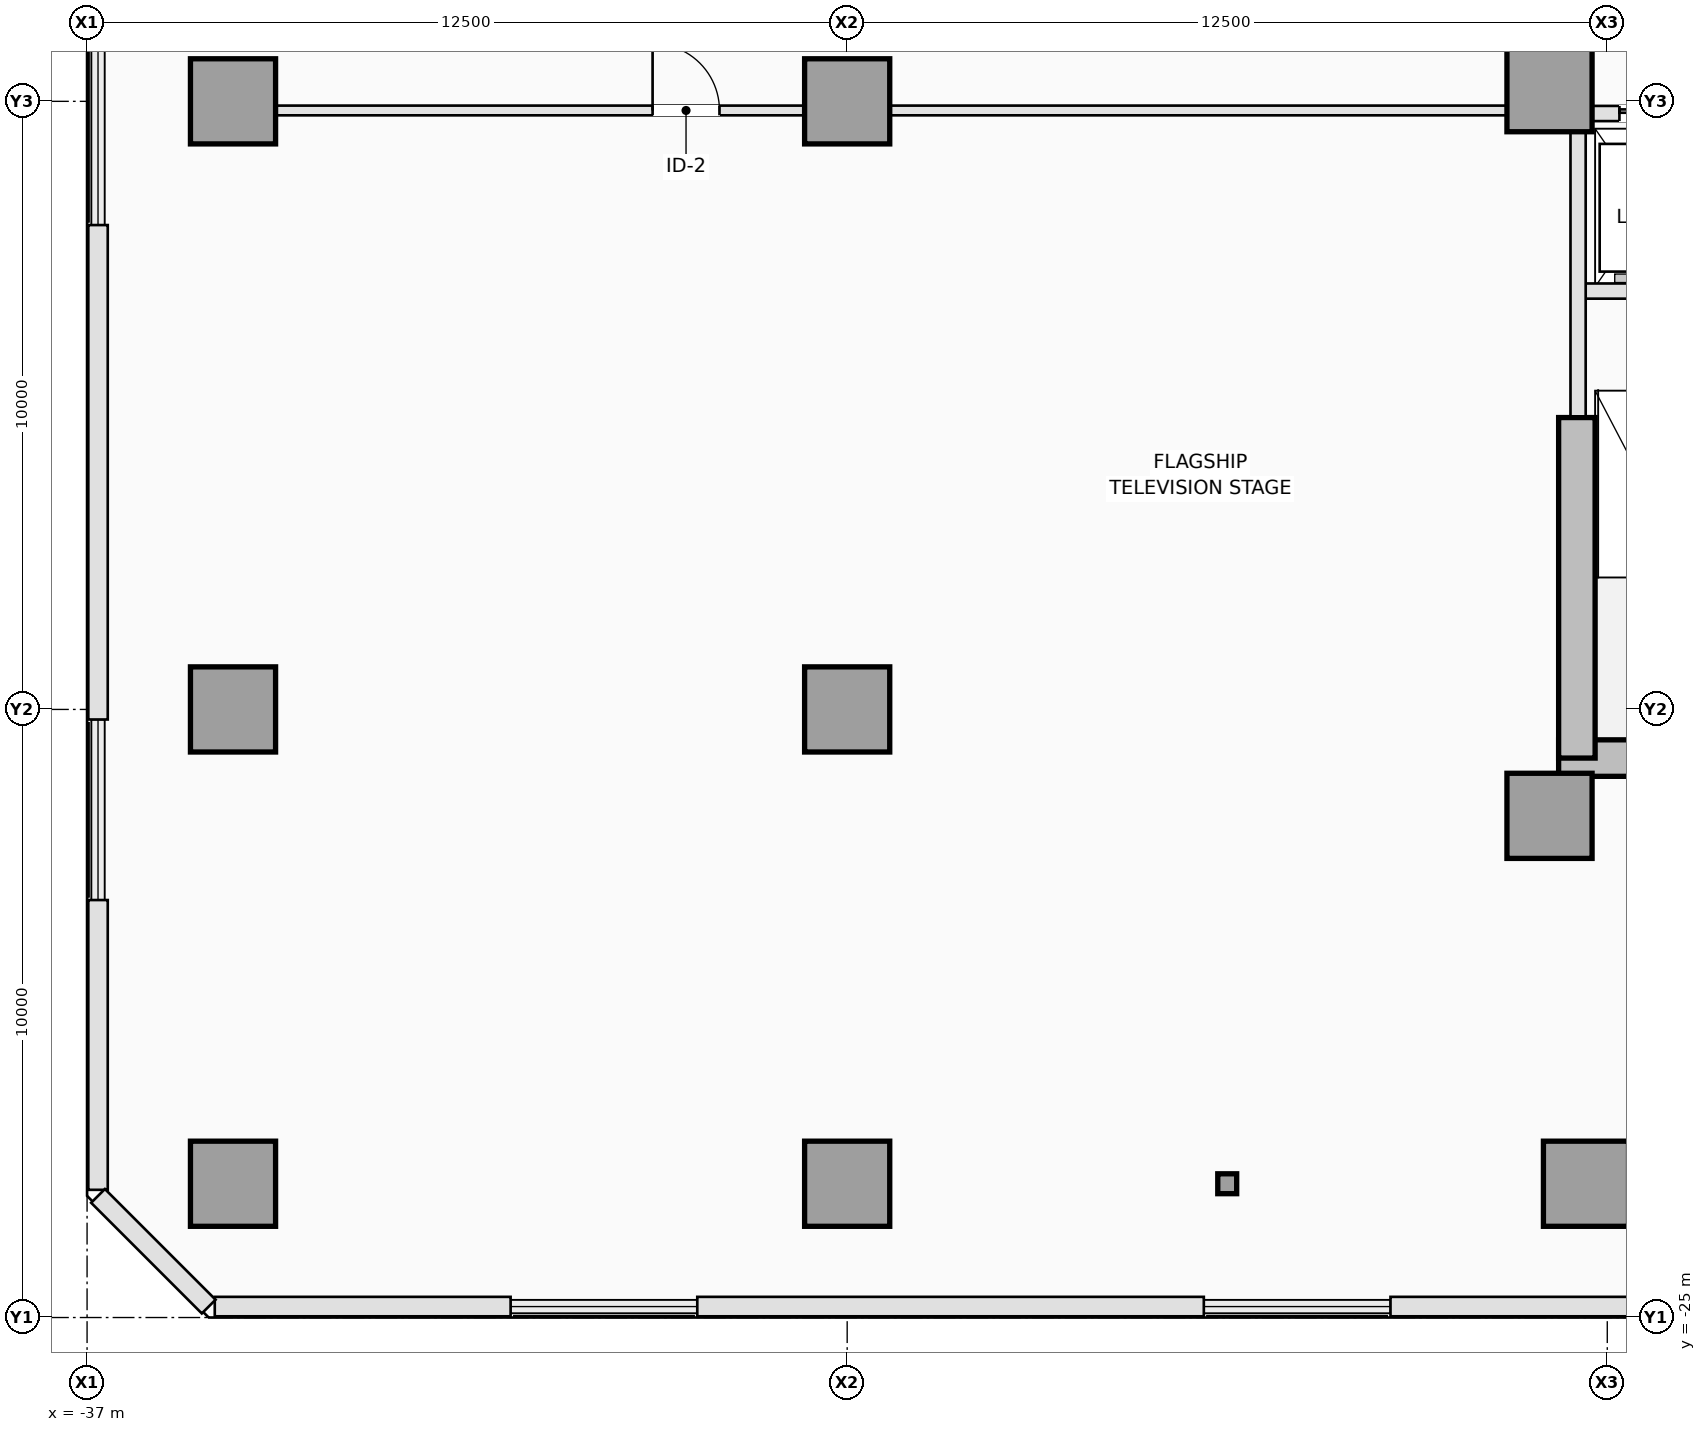
"""IFC4 building model, lengths in metres.
Left out: names, types, materials, properties, quantities, classifications, styles, units other than length and angle.
Written with IfcOpenShell. Run it as: python <this file> out.ifc"""

import sys

from ifc_helpers import new_model, si_unit, direction, frame, frame_2d, origin, origin_2d, place, context, subcontext, project, spatial, rectangle, i_section, extrude, element, fill, save


model = new_model("IFC4")
c1 = context("Model", 3, precision=1e-05, world=origin(), true_north=direction((0.0, 1.0)))
c2 = subcontext(c1, "Body", "Model", "MODEL_VIEW")
j1 = project(units=[si_unit("LENGTHUNIT", "METRE"), si_unit("PLANEANGLEUNIT", "RADIAN")], contexts=[c1])
p1 = place(None, origin())
s1 = spatial("IfcSite", under=j1, at=p1, CompositionType="ELEMENT")
p2 = place(p1, origin())
s2 = spatial("IfcBuilding", under=s1, at=p2, CompositionType="ELEMENT")
p3 = place(p2, frame((0.0, 0.0, 18.5)))
s3 = spatial("IfcBuildingStorey", under=s2, at=p3, CompositionType="ELEMENT", Elevation=18.5)
p4 = place(p3, frame((-12.8, -15.8, 0.0), z_axis=(0.0, 0.0, 1.0), x_axis=(1.0, 0.0, 0.0)))
e1 = element("IfcWall", 1, at=p4, inside=s3, PredefinedType="SHEAR", context=c2, shape_type="SweptSolid", body=[
    extrude(rectangle(XDim=4.2, YDim=0.6, at=frame_2d((2.1, 0.0))), origin(), (0.0, 0.0, 1.0), 4.5),
])
p5 = place(p3, frame((-12.5, -15.8, 0.0), z_axis=(0.0, 0.0, 1.0), x_axis=(0.0, 1.0, 0.0)))
e2 = element("IfcWall", 2, at=p5, inside=s3, PredefinedType="SHEAR", context=c2, shape_type="SweptSolid", body=[
    extrude(rectangle(XDim=5.6, YDim=0.6, at=frame_2d((2.8, 0.0))), origin(), (0.0, 0.0, 1.0), 4.5),
])
for number, where, z_axis, x_axis in (
    (3, (-12.95, -16.75, 0.0), (0.0, 0.0, 1.0), (1.0, 0.0, 0.0)),
    (4, (-12.95, -4.8, 0.0), (0.0, 0.0, 1.0), (1.0, 0.0, 0.0)),
    (5, (-34.6, -22.8, 0.0), (0.0, 0.0, 1.0), (1.0, 0.0, 0.0)),
    (6, (-24.5, -22.8, 0.0), (0.0, 0.0, 1.0), (1.0, 0.0, 0.0)),
    (7, (-12.35, -22.8, 0.0), (0.0, 0.0, 1.0), (1.0, 0.0, 0.0)),
    (8, (-34.6, -15.0, 0.0), (0.0, 0.0, 1.0), (1.0, 0.0, 0.0)),
    (9, (-24.5, -15.0, 0.0), (0.0, 0.0, 1.0), (1.0, 0.0, 0.0)),
    (10, (-34.6, -5.0, 0.0), (0.0, 0.0, 1.0), (1.0, 0.0, 0.0)),
    (11, (-24.5, -5.0, 0.0), (0.0, 0.0, 1.0), (1.0, 0.0, 0.0)),
):
    element("IfcColumn", number, at=place(p3, frame(where, z_axis=z_axis, x_axis=x_axis)), inside=s3, PredefinedType="COLUMN", context=c2, shape_type="SweptSolid", body=[
        extrude(rectangle(XDim=1.4, YDim=1.4, at=origin_2d()), origin(), (0.0, 0.0, 1.0), 4.5),
    ])
p6 = place(p3, frame((-18.25, -22.8, 0.0), z_axis=(0.0, 0.0, 1.0), x_axis=(1.0, 0.0, 0.0)))
e12 = element("IfcColumn", 12, at=p6, inside=s3, PredefinedType="COLUMN", context=c2, shape_type="SweptSolid", body=[
    extrude(i_section(OverallWidth=0.311, OverallDepth=0.327, WebThickness=0.016, FlangeThickness=0.025, FilletRadius=0.017, at=origin_2d()), origin(), (0.0, 0.0, 1.0), 4.5),
])
p7 = place(p3, frame((-7.235, -24.82, 0.0), z_axis=(0.0, 0.0, 1.0), x_axis=(-1.0, 0.0, 0.0)))
e13 = element("IfcWall", 13, at=p7, inside=s3, PredefinedType="STANDARD", context=c2, shape_type="SweptSolid", body=[
    extrude(rectangle(XDim=8.33, YDim=0.32, at=frame_2d((4.165, 0.0))), origin(), (0.0, 0.0, 1.0), 4.08),
])
p8 = place(p3, frame((-18.635, -24.82, 0.0), z_axis=(0.0, 0.0, 1.0), x_axis=(-1.0, 0.0, 0.0)))
e14 = element("IfcWall", 14, at=p8, inside=s3, PredefinedType="STANDARD", context=c2, shape_type="SweptSolid", body=[
    extrude(rectangle(XDim=8.33, YDim=0.32, at=frame_2d((4.165, 0.0))), origin(), (0.0, 0.0, 1.0), 4.08),
])
p9 = place(p3, frame((-30.035, -24.82, 0.0), z_axis=(0.0, 0.0, 1.0), x_axis=(-1.0, 0.0, 0.0)))
e15 = element("IfcWall", 15, at=p9, inside=s3, PredefinedType="STANDARD", context=c2, shape_type="SweptSolid", body=[
    extrude(rectangle(XDim=4.865, YDim=0.32, at=frame_2d((2.433, 0.0))), origin(), (0.0, 0.0, 1.0), 4.08),
])
p10 = place(p3, frame((-36.82, -22.9, 0.0), z_axis=(0.0, 0.0, 1.0), x_axis=(0.0, 1.0, 0.0)))
e16 = element("IfcWall", 16, at=p10, inside=s3, PredefinedType="STANDARD", context=c2, shape_type="SweptSolid", body=[
    extrude(rectangle(XDim=4.765, YDim=0.32, at=frame_2d((2.383, 0.0))), origin(), (0.0, 0.0, 1.0), 4.08),
])
p11 = place(p3, frame((-36.82, -15.165, 0.0), z_axis=(0.0, 0.0, 1.0), x_axis=(0.0, 1.0, 0.0)))
e17 = element("IfcWall", 17, at=p11, inside=s3, PredefinedType="STANDARD", context=c2, shape_type="SweptSolid", body=[
    extrude(rectangle(XDim=8.131, YDim=0.32, at=frame_2d((4.065, 0.0))), origin(), (0.0, 0.0, 1.0), 4.08),
])
p12 = place(p3, frame((-35.0, -24.82, 0.0), z_axis=(0.0, 0.0, 1.0), x_axis=(-0.707106781187, 0.707106781187, 0.0)))
e18 = element("IfcWall", 18, at=p12, inside=s3, PredefinedType="STANDARD", context=c2, shape_type="SweptSolid", body=[
    extrude(rectangle(XDim=2.574, YDim=0.32, at=frame_2d((1.287, 0.0))), origin(), (0.0, 0.0, 1.0), 4.08),
])
p13 = place(p3, frame((-12.38, -8.12, 0.0), z_axis=(0.0, 0.0, 1.0), x_axis=(1.0, 0.0, 0.0)))
e19 = element("IfcWall", 19, at=p13, inside=s3, PredefinedType="PARTITIONING", context=c2, shape_type="SweptSolid", body=[
    extrude(rectangle(XDim=3.22, YDim=0.25, at=frame_2d((1.61, 0.0))), origin(), (0.0, 0.0, 1.0), 4.08),
])
p14 = place(p3, frame((-12.48, -10.18, 0.0), z_axis=(0.0, 0.0, 1.0), x_axis=(0.0, 1.0, 0.0)))
e20 = element("IfcWall", 20, at=p14, inside=s3, PredefinedType="PARTITIONING", context=c2, shape_type="SweptSolid", body=[
    extrude(rectangle(XDim=4.678, YDim=0.25, at=frame_2d((2.339, 0.0))), origin(), (0.0, 0.0, 1.0), 4.08),
])
p15 = place(p3, frame((-12.248, -5.2, 0.0), z_axis=(0.0, 0.0, 1.0), x_axis=(1.0, 0.0, 0.0)))
e21 = element("IfcWall", 21, at=p15, inside=s3, PredefinedType="PARTITIONING", context=c2, shape_type="SweptSolid", body=[
    extrude(rectangle(XDim=7.796, YDim=0.25, at=frame_2d((3.898, 0.0))), origin(), (0.0, 0.0, 1.0), 4.08),
])
p16 = place(p15, frame((0.448, 0.0, 0.0)))
e22 = element("IfcOpeningElement", 22, at=p16, cuts=e21, PredefinedType="OPENING", context=c2, shape_type="SweptSolid", body=[
    extrude(rectangle(XDim=1.0, YDim=2.15, at=frame_2d((0.5, 1.075))), frame((0.0, 0.135, 0.0), z_axis=(0.0, -1.0, 0.0), x_axis=(1.0, 0.0, 0.0)), (0.0, 0.0, 1.0), 0.27),
])
p17 = place(p15, frame((2.398, 0.0, 0.0)))
e23 = element("IfcOpeningElement", 23, at=p17, cuts=e21, PredefinedType="OPENING", context=c2, shape_type="SweptSolid", body=[
    extrude(rectangle(XDim=1.0, YDim=2.15, at=frame_2d((0.5, 1.075))), frame((0.0, 0.135, 0.0), z_axis=(0.0, -1.0, 0.0), x_axis=(1.0, 0.0, 0.0)), (0.0, 0.0, 1.0), 0.27),
])
p18 = place(p15, frame((4.348, 0.0, 0.0)))
e24 = element("IfcOpeningElement", 24, at=p18, cuts=e21, PredefinedType="OPENING", context=c2, shape_type="SweptSolid", body=[
    extrude(rectangle(XDim=1.0, YDim=2.15, at=frame_2d((0.5, 1.075))), frame((0.0, 0.135, 0.0), z_axis=(0.0, -1.0, 0.0), x_axis=(1.0, 0.0, 0.0)), (0.0, 0.0, 1.0), 0.27),
])
p19 = place(p15, frame((6.298, 0.0, 0.0)))
e25 = element("IfcOpeningElement", 25, at=p19, cuts=e21, PredefinedType="OPENING", context=c2, shape_type="SweptSolid", body=[
    extrude(rectangle(XDim=1.0, YDim=2.15, at=frame_2d((0.5, 1.075))), frame((0.0, 0.135, 0.0), z_axis=(0.0, -1.0, 0.0), x_axis=(1.0, 0.0, 0.0)), (0.0, 0.0, 1.0), 0.27),
])
p20 = place(p3, frame((-33.898, -5.15, 0.0), z_axis=(0.0, 0.0, 1.0), x_axis=(1.0, 0.0, 0.0)))
e26 = element("IfcWall", 26, at=p20, inside=s3, PredefinedType="PARTITIONING", context=c2, shape_type="SweptSolid", body=[
    extrude(rectangle(XDim=8.696, YDim=0.16, at=frame_2d((4.348, 0.0))), origin(), (0.0, 0.0, 1.0), 3.056),
])
p21 = place(p20, frame((6.198, 0.0, 0.0)))
e27 = element("IfcOpeningElement", 27, at=p21, cuts=e26, PredefinedType="OPENING", context=c2, shape_type="SweptSolid", body=[
    extrude(rectangle(XDim=1.1, YDim=2.15, at=frame_2d((0.55, 1.075))), frame((0.0, 0.09, 0.0), z_axis=(0.0, -1.0, 0.0), x_axis=(1.0, 0.0, 0.0)), (0.0, 0.0, 1.0), 0.18),
])
p22 = place(p3, frame((-23.798, -5.15, 0.0), z_axis=(0.0, 0.0, 1.0), x_axis=(1.0, 0.0, 0.0)))
e28 = element("IfcWall", 28, at=p22, inside=s3, PredefinedType="PARTITIONING", context=c2, shape_type="SweptSolid", body=[
    extrude(rectangle(XDim=10.146, YDim=0.16, at=frame_2d((5.073, 0.0))), origin(), (0.0, 0.0, 1.0), 3.056),
])
p23 = place(p16, origin())
e29 = element("IfcDoor", 29, at=p23, inside=s3, OperationType="SLIDING_TO_LEFT", PredefinedType="DOOR", context=c2, shape_type="SweptSolid", body=[
    extrude(rectangle(XDim=1.0, YDim=2.15, at=frame_2d((0.5, 1.075))), frame((0.0, 0.025, 0.0), z_axis=(0.0, -1.0, 0.0), x_axis=(1.0, 0.0, 0.0)), (0.0, 0.0, 1.0), 0.05),
])
fill(e22, e29)
p24 = place(p21, origin())
e30 = element("IfcDoor", 30, at=p24, inside=s3, OperationType="SINGLE_SWING_LEFT", PredefinedType="DOOR", context=c2, shape_type="SweptSolid", body=[
    extrude(rectangle(XDim=1.1, YDim=2.15, at=frame_2d((0.55, 1.075))), frame((0.0, 0.025, 0.0), z_axis=(0.0, -1.0, 0.0), x_axis=(1.0, 0.0, 0.0)), (0.0, 0.0, 1.0), 0.05),
])
fill(e27, e30)
save(model, sys.argv[1])
